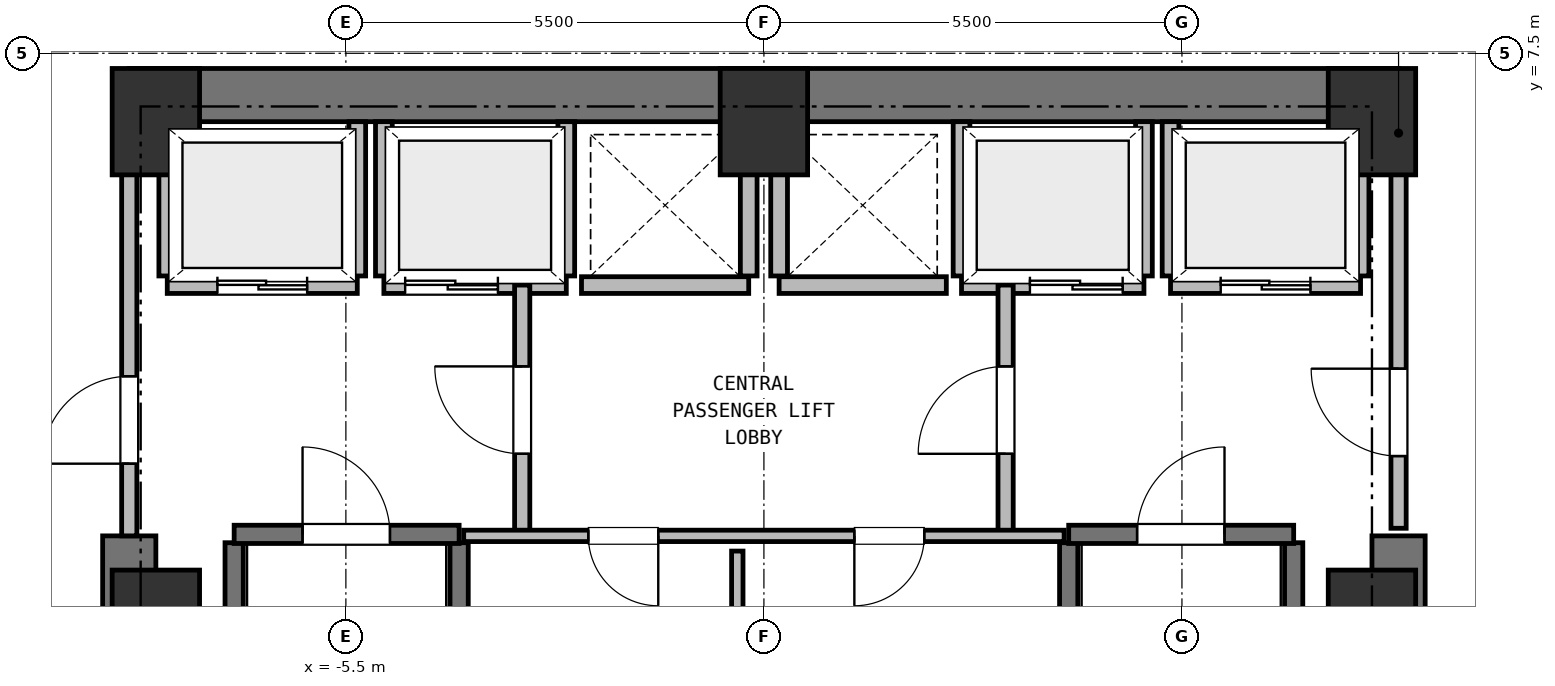
"""IFC4 building model, lengths in metres.
Left out: names, types, materials, properties, quantities, classifications, styles, units other than length and angle.
Written with IfcOpenShell. Run it as: python <this file> out.ifc"""

import sys

from ifc_helpers import new_model, si_unit, direction, frame, frame_2d, origin, origin_2d, place, context, subcontext, project, spatial, rectangle, extrude, element, fill, save


model = new_model("IFC4")
c1 = context("Model", 3, precision=1e-05, world=origin(), true_north=direction((0.0, 1.0)))
c2 = subcontext(c1, "Body", "Model", "MODEL_VIEW")
j1 = project(units=[si_unit("LENGTHUNIT", "METRE"), si_unit("PLANEANGLEUNIT", "RADIAN")], contexts=[c1])
p1 = place(None, origin())
s1 = spatial("IfcSite", under=j1, at=p1, CompositionType="ELEMENT")
p2 = place(p1, origin())
s2 = spatial("IfcBuilding", under=s1, at=p2, CompositionType="ELEMENT")
p3 = place(p2, frame((0.0, 0.0, 53.0)))
s3 = spatial("IfcBuildingStorey", under=s2, at=p3, CompositionType="ELEMENT", Elevation=53.0)
for number, where, z_axis, x_axis in (
    (1, (8.0, 0.0, 0.0), (0.0, 0.0, 1.0), (1.0, 0.0, 0.0)),
    (2, (8.0, 6.6, 0.0), (0.0, 0.0, 1.0), (1.0, 0.0, 0.0)),
    (3, (0.0, 6.6, 0.0), (0.0, 0.0, 1.0), (1.0, 0.0, 0.0)),
    (4, (-8.0, 6.6, 0.0), (0.0, 0.0, 1.0), (1.0, 0.0, 0.0)),
    (5, (-8.0, 0.0, 0.0), (0.0, 0.0, 1.0), (1.0, 0.0, 0.0)),
):
    element("IfcColumn", number, at=place(p3, frame(where, z_axis=z_axis, x_axis=x_axis)), inside=s3, PredefinedType="COLUMN", context=c2, shape_type="SweptSolid", body=[
        extrude(rectangle(XDim=1.15, YDim=1.4, at=origin_2d()), origin(), (0.0, 0.0, 1.0), 3.75),
    ])
p4 = place(p3, frame((-8.35, 6.95, 0.0), z_axis=(0.0, 0.0, 1.0), x_axis=(1.0, 0.0, 0.0)))
e6 = element("IfcWall", 6, at=p4, inside=s3, PredefinedType="SHEAR", context=c2, shape_type="SweptSolid", body=[
    extrude(rectangle(XDim=16.7, YDim=0.7, at=frame_2d((8.35, 0.0))), origin(), (0.0, 0.0, 1.0), 3.5),
])
for number, where, z_axis, x_axis in (
    (7, (-8.35, -6.95, 0.0), (0.0, 0.0, 1.0), (0.0, 1.0, 0.0)),
    (8, (8.35, -6.95, 0.0), (0.0, 0.0, 1.0), (0.0, 1.0, 0.0)),
):
    element("IfcWall", number, at=place(p3, frame(where, z_axis=z_axis, x_axis=x_axis)), inside=s3, PredefinedType="SHEAR", context=c2, shape_type="SweptSolid", body=[
        extrude(rectangle(XDim=8.1, YDim=0.7, at=frame_2d((4.05, 0.0))), origin(), (0.0, 0.0, 1.0), 3.5),
    ])
p5 = place(p3, frame((9.485, 13.319, 0.0), z_axis=(0.0, 0.0, 1.0), x_axis=(0.587787785243, -0.809015154073, 0.0)))
e9 = element("IfcWall", 9, at=p5, inside=s3, PredefinedType="SOLIDWALL", context=c2, shape_type="SweptSolid", body=[
    extrude(rectangle(XDim=10.4, YDim=0.36, at=frame_2d((5.2, 0.0))), origin(), (0.0, 0.0, 1.0), 3.5),
])
p6 = place(p5, frame((6.0, 0.0, 0.0)))
e10 = element("IfcOpeningElement", 10, at=p6, cuts=e9, PredefinedType="OPENING", context=c2, shape_type="SweptSolid", body=[
    extrude(rectangle(XDim=1.65, YDim=2.25, at=frame_2d((0.825, 1.125))), frame((0.0, 0.19, 0.0), z_axis=(0.0, -1.0, 0.0), x_axis=(1.0, 0.0, 0.0)), (0.0, 0.0, 1.0), 0.38),
])
for number, where, z_axis, x_axis in (
    (11, (-6.97, -6.16, 0.0), (0.0, 0.0, 1.0), (0.0, 1.0, 0.0)),
    (12, (-4.01, -6.16, 0.0), (0.0, 0.0, 1.0), (0.0, 1.0, 0.0)),
):
    element("IfcWall", number, at=place(p3, frame(where, z_axis=z_axis, x_axis=x_axis)), inside=s3, PredefinedType="SHEAR", context=c2, shape_type="SweptSolid", body=[
        extrude(rectangle(XDim=7.22, YDim=0.24, at=frame_2d((3.61, 0.0))), origin(), (0.0, 0.0, 1.0), 3.5),
    ])
p7 = place(p3, frame((-6.97, 1.17, 0.0), z_axis=(0.0, 0.0, 1.0), x_axis=(1.0, 0.0, 0.0)))
e13 = element("IfcWall", 13, at=p7, inside=s3, PredefinedType="SHEAR", context=c2, shape_type="SweptSolid", body=[
    extrude(rectangle(XDim=2.96, YDim=0.24, at=frame_2d((1.48, 0.0))), origin(), (0.0, 0.0, 1.0), 3.5),
])
p8 = place(p7, frame((0.9, 0.0, 0.0)))
e14 = element("IfcOpeningElement", 14, at=p8, cuts=e13, PredefinedType="OPENING", context=c2, shape_type="SweptSolid", body=[
    extrude(rectangle(XDim=1.15, YDim=2.15, at=frame_2d((0.575, 1.075))), frame((0.0, 0.13, 0.0), z_axis=(0.0, -1.0, 0.0), x_axis=(1.0, 0.0, 0.0)), (0.0, 0.0, 1.0), 0.26),
])
for number, where, z_axis, x_axis in (
    (15, (4.01, -6.16, 0.0), (0.0, 0.0, 1.0), (0.0, 1.0, 0.0)),
    (16, (6.97, -6.16, 0.0), (0.0, 0.0, 1.0), (0.0, 1.0, 0.0)),
):
    element("IfcWall", number, at=place(p3, frame(where, z_axis=z_axis, x_axis=x_axis)), inside=s3, PredefinedType="SHEAR", context=c2, shape_type="SweptSolid", body=[
        extrude(rectangle(XDim=7.22, YDim=0.24, at=frame_2d((3.61, 0.0))), origin(), (0.0, 0.0, 1.0), 3.5),
    ])
p9 = place(p3, frame((4.01, 1.17, 0.0), z_axis=(0.0, 0.0, 1.0), x_axis=(1.0, 0.0, 0.0)))
e17 = element("IfcWall", 17, at=p9, inside=s3, PredefinedType="SHEAR", context=c2, shape_type="SweptSolid", body=[
    extrude(rectangle(XDim=2.96, YDim=0.24, at=frame_2d((1.48, 0.0))), origin(), (0.0, 0.0, 1.0), 3.5),
])
p10 = place(p9, frame((0.9, 0.0, 0.0)))
e18 = element("IfcOpeningElement", 18, at=p10, cuts=e17, PredefinedType="OPENING", context=c2, shape_type="SweptSolid", body=[
    extrude(rectangle(XDim=1.15, YDim=2.15, at=frame_2d((0.575, 1.075))), frame((0.0, 0.13, 0.0), z_axis=(0.0, -1.0, 0.0), x_axis=(1.0, 0.0, 0.0)), (0.0, 0.0, 1.0), 0.26),
])
p11 = place(p3, frame((-7.85, 4.45, 0.0), z_axis=(0.0, 0.0, 1.0), x_axis=(1.0, 0.0, 0.0)))
e19 = element("IfcWall", 19, at=p11, inside=s3, PredefinedType="PARTITIONING", context=c2, shape_type="SweptSolid", body=[
    extrude(rectangle(XDim=2.5, YDim=0.22, at=frame_2d((1.25, 0.0))), origin(), (0.0, 0.0, 1.0), 3.5),
])
p12 = place(p11, frame((0.66, 0.0, 0.0)))
e20 = element("IfcOpeningElement", 20, at=p12, cuts=e19, PredefinedType="OPENING", context=c2, shape_type="SweptSolid", body=[
    extrude(rectangle(XDim=1.18, YDim=2.15, at=frame_2d((0.59, 1.075))), frame((0.0, 0.12, 0.0), z_axis=(0.0, -1.0, 0.0), x_axis=(1.0, 0.0, 0.0)), (0.0, 0.0, 1.0), 0.24),
])
p13 = place(p3, frame((-7.85, 4.57, 0.0), z_axis=(0.0, 0.0, 1.0), x_axis=(0.0, 1.0, 0.0)))
e21 = element("IfcWall", 21, at=p13, inside=s3, PredefinedType="PARTITIONING", context=c2, shape_type="SweptSolid", body=[
    extrude(rectangle(XDim=2.03, YDim=0.22, at=frame_2d((1.015, 0.0))), origin(), (0.0, 0.0, 1.0), 3.08),
])
p14 = place(p3, frame((-5.35, 4.57, 0.0), z_axis=(0.0, 0.0, 1.0), x_axis=(0.0, 1.0, 0.0)))
e22 = element("IfcWall", 22, at=p14, inside=s3, PredefinedType="PARTITIONING", context=c2, shape_type="SweptSolid", body=[
    extrude(rectangle(XDim=2.03, YDim=0.22, at=frame_2d((1.015, 0.0))), origin(), (0.0, 0.0, 1.0), 3.5),
])
p15 = place(p3, frame((5.35, 4.45, 0.0), z_axis=(0.0, 0.0, 1.0), x_axis=(1.0, 0.0, 0.0)))
e23 = element("IfcWall", 23, at=p15, inside=s3, PredefinedType="PARTITIONING", context=c2, shape_type="SweptSolid", body=[
    extrude(rectangle(XDim=2.5, YDim=0.22, at=frame_2d((1.25, 0.0))), origin(), (0.0, 0.0, 1.0), 3.5),
])
p16 = place(p15, frame((0.66, 0.0, 0.0)))
e24 = element("IfcOpeningElement", 24, at=p16, cuts=e23, PredefinedType="OPENING", context=c2, shape_type="SweptSolid", body=[
    extrude(rectangle(XDim=1.18, YDim=2.15, at=frame_2d((0.59, 1.075))), frame((0.0, 0.12, 0.0), z_axis=(0.0, -1.0, 0.0), x_axis=(1.0, 0.0, 0.0)), (0.0, 0.0, 1.0), 0.24),
])
p17 = place(p3, frame((5.35, 4.57, 0.0), z_axis=(0.0, 0.0, 1.0), x_axis=(0.0, 1.0, 0.0)))
e25 = element("IfcWall", 25, at=p17, inside=s3, PredefinedType="PARTITIONING", context=c2, shape_type="SweptSolid", body=[
    extrude(rectangle(XDim=2.03, YDim=0.22, at=frame_2d((1.015, 0.0))), origin(), (0.0, 0.0, 1.0), 3.5),
])
p18 = place(p3, frame((7.85, 4.57, 0.0), z_axis=(0.0, 0.0, 1.0), x_axis=(0.0, 1.0, 0.0)))
e26 = element("IfcWall", 26, at=p18, inside=s3, PredefinedType="PARTITIONING", context=c2, shape_type="SweptSolid", body=[
    extrude(rectangle(XDim=2.03, YDim=0.22, at=frame_2d((1.015, 0.0))), origin(), (0.0, 0.0, 1.0), 3.08),
])
p19 = place(p3, frame((-5.0, 4.45, 0.0), z_axis=(0.0, 0.0, 1.0), x_axis=(1.0, 0.0, 0.0)))
e27 = element("IfcWall", 27, at=p19, inside=s3, PredefinedType="PARTITIONING", context=c2, shape_type="SweptSolid", body=[
    extrude(rectangle(XDim=2.4, YDim=0.22, at=frame_2d((1.2, 0.0))), origin(), (0.0, 0.0, 1.0), 3.5),
])
p20 = place(p19, frame((0.28, 0.0, 0.0)))
e28 = element("IfcOpeningElement", 28, at=p20, cuts=e27, PredefinedType="OPENING", context=c2, shape_type="SweptSolid", body=[
    extrude(rectangle(XDim=1.22, YDim=2.15, at=frame_2d((0.61, 1.075))), frame((0.0, 0.12, 0.0), z_axis=(0.0, -1.0, 0.0), x_axis=(1.0, 0.0, 0.0)), (0.0, 0.0, 1.0), 0.24),
])
for number, where, z_axis, x_axis in (
    (29, (-5.0, 4.57, 0.0), (0.0, 0.0, 1.0), (0.0, 1.0, 0.0)),
    (30, (-2.6, 4.57, 0.0), (0.0, 0.0, 1.0), (0.0, 1.0, 0.0)),
):
    element("IfcWall", number, at=place(p3, frame(where, z_axis=z_axis, x_axis=x_axis)), inside=s3, PredefinedType="PARTITIONING", context=c2, shape_type="SweptSolid", body=[
        extrude(rectangle(XDim=2.03, YDim=0.22, at=frame_2d((1.015, 0.0))), origin(), (0.0, 0.0, 1.0), 3.5),
    ])
p21 = place(p3, frame((2.6, 4.45, 0.0), z_axis=(0.0, 0.0, 1.0), x_axis=(1.0, 0.0, 0.0)))
e31 = element("IfcWall", 31, at=p21, inside=s3, PredefinedType="PARTITIONING", context=c2, shape_type="SweptSolid", body=[
    extrude(rectangle(XDim=2.4, YDim=0.22, at=frame_2d((1.2, 0.0))), origin(), (0.0, 0.0, 1.0), 3.5),
])
p22 = place(p21, frame((0.9, 0.0, 0.0)))
e32 = element("IfcOpeningElement", 32, at=p22, cuts=e31, PredefinedType="OPENING", context=c2, shape_type="SweptSolid", body=[
    extrude(rectangle(XDim=1.22, YDim=2.15, at=frame_2d((0.61, 1.075))), frame((0.0, 0.12, 0.0), z_axis=(0.0, -1.0, 0.0), x_axis=(1.0, 0.0, 0.0)), (0.0, 0.0, 1.0), 0.24),
])
for number, where, z_axis, x_axis in (
    (33, (2.6, 4.57, 0.0), (0.0, 0.0, 1.0), (0.0, 1.0, 0.0)),
    (34, (5.0, 4.57, 0.0), (0.0, 0.0, 1.0), (0.0, 1.0, 0.0)),
):
    element("IfcWall", number, at=place(p3, frame(where, z_axis=z_axis, x_axis=x_axis)), inside=s3, PredefinedType="PARTITIONING", context=c2, shape_type="SweptSolid", body=[
        extrude(rectangle(XDim=2.03, YDim=0.22, at=frame_2d((1.015, 0.0))), origin(), (0.0, 0.0, 1.0), 3.5),
    ])
p23 = place(p3, frame((-2.4, 4.45, 0.0), z_axis=(0.0, 0.0, 1.0), x_axis=(1.0, 0.0, 0.0)))
e35 = element("IfcWall", 35, at=p23, inside=s3, PredefinedType="PARTITIONING", context=c2, shape_type="SweptSolid", body=[
    extrude(rectangle(XDim=2.2, YDim=0.22, at=frame_2d((1.1, 0.0))), origin(), (0.0, 0.0, 1.0), 3.5),
])
p24 = place(p3, frame((-0.2, 4.57, 0.0), z_axis=(0.0, 0.0, 1.0), x_axis=(0.0, 1.0, 0.0)))
e36 = element("IfcWall", 36, at=p24, inside=s3, PredefinedType="PARTITIONING", context=c2, shape_type="SweptSolid", body=[
    extrude(rectangle(XDim=2.03, YDim=0.22, at=frame_2d((1.015, 0.0))), origin(), (0.0, 0.0, 1.0), 3.5),
])
p25 = place(p3, frame((0.2, 4.45, 0.0), z_axis=(0.0, 0.0, 1.0), x_axis=(1.0, 0.0, 0.0)))
e37 = element("IfcWall", 37, at=p25, inside=s3, PredefinedType="PARTITIONING", context=c2, shape_type="SweptSolid", body=[
    extrude(rectangle(XDim=2.2, YDim=0.22, at=frame_2d((1.1, 0.0))), origin(), (0.0, 0.0, 1.0), 3.5),
])
p26 = place(p3, frame((0.2, 4.57, 0.0), z_axis=(0.0, 0.0, 1.0), x_axis=(0.0, 1.0, 0.0)))
e38 = element("IfcWall", 38, at=p26, inside=s3, PredefinedType="PARTITIONING", context=c2, shape_type="SweptSolid", body=[
    extrude(rectangle(XDim=2.03, YDim=0.22, at=frame_2d((1.015, 0.0))), origin(), (0.0, 0.0, 1.0), 3.5),
])
p27 = place(p3, frame((-3.18, 1.15, 0.0), z_axis=(0.0, 0.0, 1.0), x_axis=(0.0, 1.0, 0.0)))
e39 = element("IfcWall", 39, at=p27, inside=s3, PredefinedType="PARTITIONING", context=c2, shape_type="SweptSolid", body=[
    extrude(rectangle(XDim=3.3, YDim=0.2, at=frame_2d((1.65, 0.0))), origin(), (0.0, 0.0, 1.0), 3.5),
])
p28 = place(p27, frame((1.08, 0.0, 0.0)))
e40 = element("IfcOpeningElement", 40, at=p28, cuts=e39, PredefinedType="OPENING", context=c2, shape_type="SweptSolid", body=[
    extrude(rectangle(XDim=1.15, YDim=2.15, at=frame_2d((0.575, 1.075))), frame((0.0, 0.11, 0.0), z_axis=(0.0, -1.0, 0.0), x_axis=(1.0, 0.0, 0.0)), (0.0, 0.0, 1.0), 0.22),
])
p29 = place(p3, frame((3.18, 1.15, 0.0), z_axis=(0.0, 0.0, 1.0), x_axis=(0.0, 1.0, 0.0)))
e41 = element("IfcWall", 41, at=p29, inside=s3, PredefinedType="PARTITIONING", context=c2, shape_type="SweptSolid", body=[
    extrude(rectangle(XDim=3.3, YDim=0.2, at=frame_2d((1.65, 0.0))), origin(), (0.0, 0.0, 1.0), 3.5),
])
p30 = place(p29, frame((1.08, 0.0, 0.0)))
e42 = element("IfcOpeningElement", 42, at=p30, cuts=e41, PredefinedType="OPENING", context=c2, shape_type="SweptSolid", body=[
    extrude(rectangle(XDim=1.15, YDim=2.15, at=frame_2d((0.575, 1.075))), frame((0.0, 0.11, 0.0), z_axis=(0.0, -1.0, 0.0), x_axis=(1.0, 0.0, 0.0)), (0.0, 0.0, 1.0), 0.22),
])
p31 = place(p3, frame((-8.35, 1.15, 0.0), z_axis=(0.0, 0.0, 1.0), x_axis=(0.0, 1.0, 0.0)))
e43 = element("IfcWall", 43, at=p31, inside=s3, PredefinedType="PARTITIONING", context=c2, shape_type="SweptSolid", body=[
    extrude(rectangle(XDim=5.4, YDim=0.2, at=frame_2d((2.7, 0.0))), origin(), (0.0, 0.0, 1.0), 3.5),
])
p32 = place(p31, frame((0.95, 0.0, 0.0)))
e44 = element("IfcOpeningElement", 44, at=p32, cuts=e43, PredefinedType="OPENING", context=c2, shape_type="SweptSolid", body=[
    extrude(rectangle(XDim=1.15, YDim=2.15, at=frame_2d((0.575, 1.075))), frame((0.0, 0.11, 0.0), z_axis=(0.0, -1.0, 0.0), x_axis=(1.0, 0.0, 0.0)), (0.0, 0.0, 1.0), 0.22),
])
p33 = place(p3, frame((8.35, 1.25, 0.0), z_axis=(0.0, 0.0, 1.0), x_axis=(0.0, 1.0, 0.0)))
e45 = element("IfcWall", 45, at=p33, inside=s3, PredefinedType="PARTITIONING", context=c2, shape_type="SweptSolid", body=[
    extrude(rectangle(XDim=5.3, YDim=0.2, at=frame_2d((2.65, 0.0))), origin(), (0.0, 0.0, 1.0), 3.5),
])
p34 = place(p33, frame((0.95, 0.0, 0.0)))
e46 = element("IfcOpeningElement", 46, at=p34, cuts=e45, PredefinedType="OPENING", context=c2, shape_type="SweptSolid", body=[
    extrude(rectangle(XDim=1.15, YDim=2.15, at=frame_2d((0.575, 1.075))), frame((0.0, 0.11, 0.0), z_axis=(0.0, -1.0, 0.0), x_axis=(1.0, 0.0, 0.0)), (0.0, 0.0, 1.0), 0.22),
])
p35 = place(p3, frame((3.95, 1.15, 0.0), z_axis=(0.0, 0.0, 1.0), x_axis=(-1.0, 0.0, 0.0)))
e47 = element("IfcWall", 47, at=p35, inside=s3, PredefinedType="PARTITIONING", context=c2, shape_type="SweptSolid", body=[
    extrude(rectangle(XDim=7.9, YDim=0.15, at=frame_2d((3.95, 0.0))), origin(), (0.0, 0.0, 1.0), 3.5),
])
p36 = place(p35, frame((5.34, 0.0, 0.0)))
e48 = element("IfcOpeningElement", 48, at=p36, cuts=e47, PredefinedType="OPENING", context=c2, shape_type="SweptSolid", body=[
    extrude(rectangle(XDim=0.92, YDim=2.05, at=frame_2d((0.46, 1.025))), frame((0.0, 0.085, 0.0), z_axis=(0.0, -1.0, 0.0), x_axis=(1.0, 0.0, 0.0)), (0.0, 0.0, 1.0), 0.17),
])
p37 = place(p35, frame((1.84, 0.0, 0.0)))
e49 = element("IfcOpeningElement", 49, at=p37, cuts=e47, PredefinedType="OPENING", context=c2, shape_type="SweptSolid", body=[
    extrude(rectangle(XDim=0.92, YDim=2.05, at=frame_2d((0.46, 1.025))), frame((0.0, 0.085, 0.0), z_axis=(0.0, -1.0, 0.0), x_axis=(1.0, 0.0, 0.0)), (0.0, 0.0, 1.0), 0.17),
])
p38 = place(p3, frame((-0.35, -1.73, 0.0), z_axis=(0.0, 0.0, 1.0), x_axis=(0.0, 1.0, 0.0)))
e50 = element("IfcWall", 50, at=p38, inside=s3, PredefinedType="PARTITIONING", context=c2, shape_type="SweptSolid", body=[
    extrude(rectangle(XDim=2.68, YDim=0.15, at=frame_2d((1.34, 0.0))), origin(), (0.0, 0.0, 1.0), 3.5),
])
for number, where, z_axis, x_axis in (
    (51, (8.578, 9.352, 0.0), (0.0, 0.0, 1.0), (0.707, -0.707, 0.0)),
    (52, (-10.752, 7.178, 0.0), (0.0, 0.0, 1.0), (0.707, 0.707, 0.0)),
):
    element("IfcWall", number, at=place(p3, frame(where, z_axis=z_axis, x_axis=x_axis)), inside=s3, PredefinedType="PARTITIONING", context=c2, shape_type="SweptSolid", body=[
        extrude(rectangle(XDim=3.074, YDim=0.15, at=frame_2d((1.537, 0.0))), origin(), (0.0, 0.0, 1.0), 3.5),
    ])
p39 = place(p8, origin())
e53 = element("IfcDoor", 53, at=p39, inside=s3, OperationType="SINGLE_SWING_LEFT", PredefinedType="DOOR", context=c2, shape_type="SweptSolid", body=[
    extrude(rectangle(XDim=1.15, YDim=2.15, at=frame_2d((0.575, 1.075))), frame((0.0, 0.025, 0.0), z_axis=(0.0, -1.0, 0.0), x_axis=(1.0, 0.0, 0.0)), (0.0, 0.0, 1.0), 0.05),
])
fill(e14, e53)
p40 = place(p10, origin())
e54 = element("IfcDoor", 54, at=p40, inside=s3, OperationType="SINGLE_SWING_RIGHT", PredefinedType="DOOR", context=c2, shape_type="SweptSolid", body=[
    extrude(rectangle(XDim=1.15, YDim=2.15, at=frame_2d((0.575, 1.075))), frame((0.0, 0.025, 0.0), z_axis=(0.0, -1.0, 0.0), x_axis=(1.0, 0.0, 0.0)), (0.0, 0.0, 1.0), 0.05),
])
fill(e18, e54)
p41 = place(p12, origin())
e55 = element("IfcDoor", 55, at=p41, inside=s3, OperationType="DOUBLE_DOOR_SLIDING", PredefinedType="DOOR", context=c2, shape_type="SweptSolid", body=[
    extrude(rectangle(XDim=1.18, YDim=2.15, at=frame_2d((0.59, 1.075))), frame((0.0, 0.025, 0.0), z_axis=(0.0, -1.0, 0.0), x_axis=(1.0, 0.0, 0.0)), (0.0, 0.0, 1.0), 0.05),
])
fill(e20, e55)
p42 = place(p16, origin())
e56 = element("IfcDoor", 56, at=p42, inside=s3, OperationType="DOUBLE_DOOR_SLIDING", PredefinedType="DOOR", context=c2, shape_type="SweptSolid", body=[
    extrude(rectangle(XDim=1.18, YDim=2.15, at=frame_2d((0.59, 1.075))), frame((0.0, 0.025, 0.0), z_axis=(0.0, -1.0, 0.0), x_axis=(1.0, 0.0, 0.0)), (0.0, 0.0, 1.0), 0.05),
])
fill(e24, e56)
p43 = place(p20, origin())
e57 = element("IfcDoor", 57, at=p43, inside=s3, OperationType="DOUBLE_DOOR_SLIDING", PredefinedType="DOOR", context=c2, shape_type="SweptSolid", body=[
    extrude(rectangle(XDim=1.22, YDim=2.15, at=frame_2d((0.61, 1.075))), frame((0.0, 0.025, 0.0), z_axis=(0.0, -1.0, 0.0), x_axis=(1.0, 0.0, 0.0)), (0.0, 0.0, 1.0), 0.05),
])
fill(e28, e57)
p44 = place(p22, origin())
e58 = element("IfcDoor", 58, at=p44, inside=s3, OperationType="DOUBLE_DOOR_SLIDING", PredefinedType="DOOR", context=c2, shape_type="SweptSolid", body=[
    extrude(rectangle(XDim=1.22, YDim=2.15, at=frame_2d((0.61, 1.075))), frame((0.0, 0.025, 0.0), z_axis=(0.0, -1.0, 0.0), x_axis=(1.0, 0.0, 0.0)), (0.0, 0.0, 1.0), 0.05),
])
fill(e32, e58)
p45 = place(p28, origin())
e59 = element("IfcDoor", 59, at=p45, inside=s3, OperationType="SINGLE_SWING_RIGHT", PredefinedType="DOOR", context=c2, shape_type="SweptSolid", body=[
    extrude(rectangle(XDim=1.15, YDim=2.15, at=frame_2d((0.575, 1.075))), frame((0.0, 0.025, 0.0), z_axis=(0.0, -1.0, 0.0), x_axis=(1.0, 0.0, 0.0)), (0.0, 0.0, 1.0), 0.05),
])
fill(e40, e59)
p46 = place(p30, origin())
e60 = element("IfcDoor", 60, at=p46, inside=s3, OperationType="SINGLE_SWING_LEFT", PredefinedType="DOOR", context=c2, shape_type="SweptSolid", body=[
    extrude(rectangle(XDim=1.15, YDim=2.15, at=frame_2d((0.575, 1.075))), frame((0.0, 0.025, 0.0), z_axis=(0.0, -1.0, 0.0), x_axis=(1.0, 0.0, 0.0)), (0.0, 0.0, 1.0), 0.05),
])
fill(e42, e60)
p47 = place(p32, origin())
e61 = element("IfcDoor", 61, at=p47, inside=s3, OperationType="SINGLE_SWING_LEFT", PredefinedType="DOOR", context=c2, shape_type="SweptSolid", body=[
    extrude(rectangle(XDim=1.15, YDim=2.15, at=frame_2d((0.575, 1.075))), frame((0.0, 0.025, 0.0), z_axis=(0.0, -1.0, 0.0), x_axis=(1.0, 0.0, 0.0)), (0.0, 0.0, 1.0), 0.05),
])
fill(e44, e61)
p48 = place(p34, origin())
e62 = element("IfcDoor", 62, at=p48, inside=s3, OperationType="SINGLE_SWING_RIGHT", PredefinedType="DOOR", context=c2, shape_type="SweptSolid", body=[
    extrude(rectangle(XDim=1.15, YDim=2.15, at=frame_2d((0.575, 1.075))), frame((0.0, 0.025, 0.0), z_axis=(0.0, -1.0, 0.0), x_axis=(1.0, 0.0, 0.0)), (0.0, 0.0, 1.0), 0.05),
])
fill(e46, e62)
p49 = place(p36, origin())
e63 = element("IfcDoor", 63, at=p49, inside=s3, OperationType="SINGLE_SWING_LEFT", PredefinedType="DOOR", context=c2, shape_type="SweptSolid", body=[
    extrude(rectangle(XDim=0.92, YDim=2.05, at=frame_2d((0.46, 1.025))), frame((0.0, 0.025, 0.0), z_axis=(0.0, -1.0, 0.0), x_axis=(1.0, 0.0, 0.0)), (0.0, 0.0, 1.0), 0.05),
])
fill(e48, e63)
p50 = place(p37, origin())
e64 = element("IfcDoor", 64, at=p50, inside=s3, OperationType="SINGLE_SWING_RIGHT", PredefinedType="DOOR", context=c2, shape_type="SweptSolid", body=[
    extrude(rectangle(XDim=0.92, YDim=2.05, at=frame_2d((0.46, 1.025))), frame((0.0, 0.025, 0.0), z_axis=(0.0, -1.0, 0.0), x_axis=(1.0, 0.0, 0.0)), (0.0, 0.0, 1.0), 0.05),
])
fill(e49, e64)
save(model, sys.argv[1])
